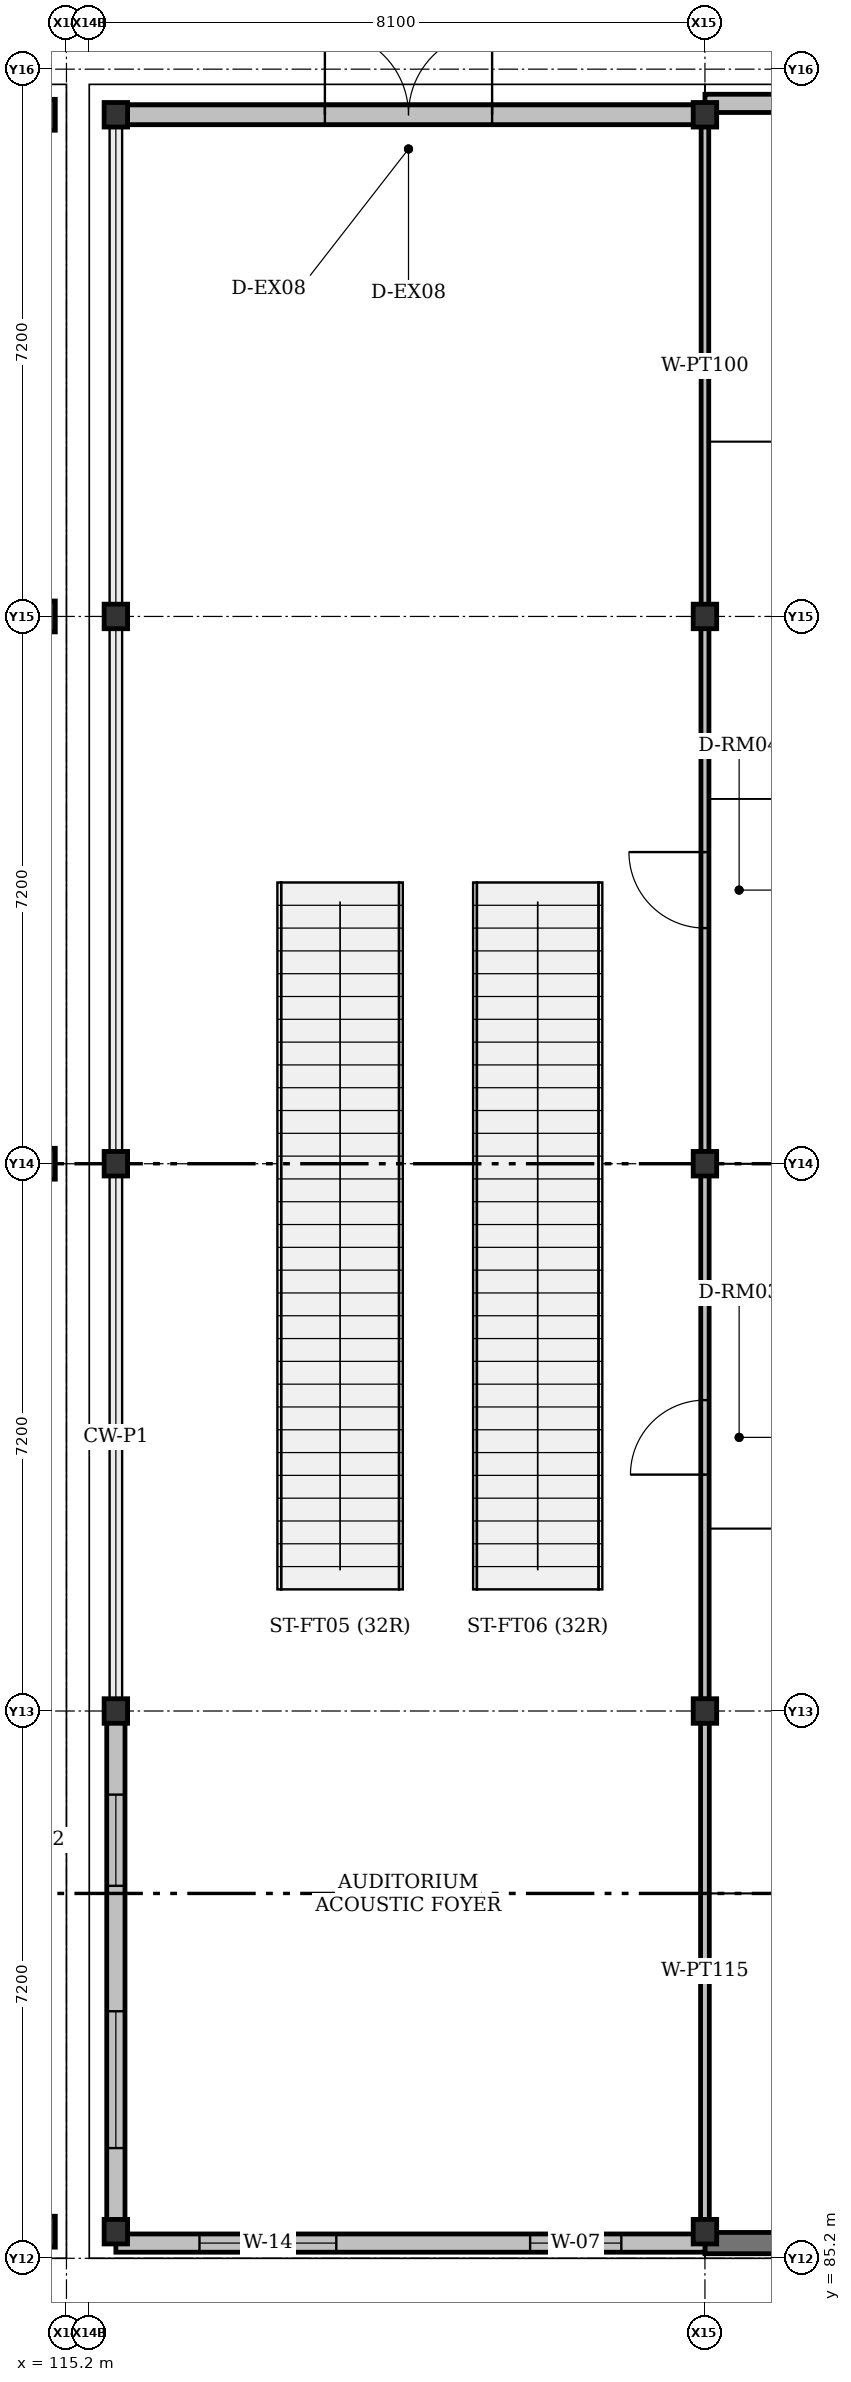
"""IFC4 building model, lengths in metres.
Left out: names, types, materials, properties, quantities, classifications, styles, units other than length and angle.
Written with IfcOpenShell. Run it as: python <this file> out.ifc"""

import sys

from ifc_helpers import new_model, si_unit, direction, frame, frame_2d, origin, origin_2d, place, context, subcontext, project, spatial, rectangle, hollow_circle, i_section, extrude, element, fill, save


model = new_model("IFC4")
c1 = context("Model", 3, precision=1e-05, world=origin(), true_north=direction((0.0, 1.0)))
c2 = subcontext(c1, "Body", "Model", "MODEL_VIEW")
j1 = project(units=[si_unit("LENGTHUNIT", "METRE"), si_unit("PLANEANGLEUNIT", "RADIAN")], contexts=[c1])
p1 = place(None, origin())
s1 = spatial("IfcSite", under=j1, at=p1, CompositionType="ELEMENT")
p2 = place(p1, origin())
s2 = spatial("IfcBuilding", under=s1, at=p2, CompositionType="ELEMENT")
p3 = place(p2, origin())
s3 = spatial("IfcBuildingStorey", under=s2, at=p3, CompositionType="ELEMENT", Elevation=0.0)
for number, where, z_axis, x_axis in (
    (1, (114.85, 85.55, 0.0), (0.0, 0.0, 1.0), (1.0, 0.0, 0.0)),
    (2, (114.85, 113.4, 0.0), (0.0, 0.0, 1.0), (1.0, 0.0, 0.0)),
    (3, (114.85, 99.6, 0.0), (0.0, 0.0, 1.0), (1.0, 0.0, 0.0)),
    (4, (114.85, 106.8, 0.0), (0.0, 0.0, 1.0), (1.0, 0.0, 0.0)),
):
    element("IfcColumn", number, at=place(p3, frame(where, z_axis=z_axis, x_axis=x_axis)), inside=s3, PredefinedType="COLUMN", context=c2, shape_type="SweptSolid", body=[
        extrude(hollow_circle(Radius=0.203, WallThickness=0.016, at=origin_2d()), origin(), (0.0, 0.0, 1.0), 5.4),
    ])
for number, where, z_axis, x_axis in (
    (5, (115.85, 85.55, 0.0), (0.0, 0.0, 1.0), (1.0, 0.0, 0.0)),
    (6, (115.85, 92.4, 0.0), (0.0, 0.0, 1.0), (1.0, 0.0, 0.0)),
    (7, (115.85, 99.6, 0.0), (0.0, 0.0, 1.0), (1.0, 0.0, 0.0)),
    (8, (115.85, 106.8, 0.0), (0.0, 0.0, 1.0), (1.0, 0.0, 0.0)),
    (9, (115.85, 113.4, 0.0), (0.0, 0.0, 1.0), (1.0, 0.0, 0.0)),
    (10, (123.6, 85.55, 0.0), (0.0, 0.0, 1.0), (1.0, 0.0, 0.0)),
    (11, (123.6, 92.4, 0.0), (0.0, 0.0, 1.0), (1.0, 0.0, 0.0)),
    (12, (123.6, 99.6, 0.0), (0.0, 0.0, 1.0), (1.0, 0.0, 0.0)),
    (13, (123.6, 106.8, 0.0), (0.0, 0.0, 1.0), (1.0, 0.0, 0.0)),
    (14, (123.6, 113.4, 0.0), (0.0, 0.0, 1.0), (1.0, 0.0, 0.0)),
):
    element("IfcColumn", number, at=place(p3, frame(where, z_axis=z_axis, x_axis=x_axis)), inside=s3, PredefinedType="COLUMN", context=c2, shape_type="SweptSolid", body=[
        extrude(i_section(OverallWidth=0.309, OverallDepth=0.323, WebThickness=0.014, FlangeThickness=0.023, FilletRadius=0.015, at=origin_2d()), origin(), (0.0, 0.0, 1.0), 5.4),
    ])
p4 = place(p3, frame((163.85, 85.4, 0.0), z_axis=(0.0, 0.0, 1.0), x_axis=(-1.0, 0.0, 0.0)))
e15 = element("IfcWall", 15, at=p4, inside=s3, PredefinedType="SOLIDWALL", context=c2, shape_type="SweptSolid", body=[
    extrude(rectangle(XDim=40.25, YDim=0.28, at=frame_2d((20.125, 0.0))), origin(), (0.0, 0.0, 1.0), 5.19),
])
p5 = place(p3, frame((115.85, 113.4, 0.0), z_axis=(0.0, 0.0, 1.0), x_axis=(1.0, 0.0, 0.0)))
e16 = element("IfcWall", 16, at=p5, inside=s3, PredefinedType="SOLIDWALL", context=c2, shape_type="SweptSolid", body=[
    extrude(rectangle(XDim=7.75, YDim=0.26, at=frame_2d((3.875, 0.0))), origin(), (0.0, 0.0, 1.0), 3.383),
])
p6 = place(p5, frame((2.75, 0.0, 0.0)))
e17 = element("IfcOpeningElement", 17, at=p6, cuts=e16, PredefinedType="OPENING", context=c2, shape_type="SweptSolid", body=[
    extrude(rectangle(XDim=2.2, YDim=2.4, at=frame_2d((1.1, 1.2))), frame((0.0, 0.13, 0.0), z_axis=(0.0, -1.0, 0.0), x_axis=(1.0, 0.0, 0.0)), (0.0, 0.0, 1.0), 0.26),
])
p7 = place(p3, frame((123.6, 113.4, 3.602), z_axis=(0.0, 0.0, 1.0), x_axis=(-1.0, 0.0, 0.0)))
e18 = element("IfcWall", 18, at=p7, inside=s3, PredefinedType="SOLIDWALL", context=c2, shape_type="SweptSolid", body=[
    extrude(rectangle(XDim=7.75, YDim=0.26, at=frame_2d((3.875, 0.0))), origin(), (0.0, 0.0, 1.0), 1.165),
])
p8 = place(p3, frame((115.85, 85.55, 0.0), z_axis=(0.0, 0.0, 1.0), x_axis=(0.0, 1.0, 0.0)))
e19 = element("IfcWall", 19, at=p8, inside=s3, PredefinedType="SOLIDWALL", context=c2, shape_type="SweptSolid", body=[
    extrude(rectangle(XDim=6.85, YDim=0.24, at=frame_2d((3.425, 0.0))), origin(), (0.0, 0.0, 1.0), 4.641),
])
p9 = place(p8, frame((1.1, 0.0, 0.92)))
e20 = element("IfcOpeningElement", 20, at=p9, cuts=e19, PredefinedType="OPENING", context=c2, shape_type="SweptSolid", body=[
    extrude(rectangle(XDim=1.8, YDim=1.4, at=frame_2d((0.9, 0.7))), frame((0.0, 0.12, 0.0), z_axis=(0.0, -1.0, 0.0), x_axis=(1.0, 0.0, 0.0)), (0.0, 0.0, 1.0), 0.24),
])
p10 = place(p8, frame((4.55, 0.0, 0.92)))
e21 = element("IfcOpeningElement", 21, at=p10, cuts=e19, PredefinedType="OPENING", context=c2, shape_type="SweptSolid", body=[
    extrude(rectangle(XDim=1.2, YDim=1.7, at=frame_2d((0.6, 0.85))), frame((0.0, 0.12, 0.0), z_axis=(0.0, -1.0, 0.0), x_axis=(1.0, 0.0, 0.0)), (0.0, 0.0, 1.0), 0.24),
])
p11 = place(p3, frame((123.6, 113.55, 0.0), z_axis=(0.0, 0.0, 1.0), x_axis=(1.0, 0.0, 0.0)))
e22 = element("IfcWall", 22, at=p11, inside=s3, PredefinedType="SOLIDWALL", context=c2, shape_type="SweptSolid", body=[
    extrude(rectangle(XDim=8.1, YDim=0.24, at=frame_2d((4.05, 0.0))), origin(), (0.0, 0.0, 1.0), 4.7),
])
p12 = place(p11, frame((1.1, 0.0, 0.92)))
e23 = element("IfcOpeningElement", 23, at=p12, cuts=e22, PredefinedType="OPENING", context=c2, shape_type="SweptSolid", body=[
    extrude(rectangle(XDim=1.8, YDim=1.4, at=frame_2d((0.9, 0.7))), frame((0.0, 0.12, 0.0), z_axis=(0.0, -1.0, 0.0), x_axis=(1.0, 0.0, 0.0)), (0.0, 0.0, 1.0), 0.24),
])
p13 = place(p11, frame((5.8, 0.0, 0.92)))
e24 = element("IfcOpeningElement", 24, at=p13, cuts=e22, PredefinedType="OPENING", context=c2, shape_type="SweptSolid", body=[
    extrude(rectangle(XDim=1.2, YDim=1.7, at=frame_2d((0.6, 0.85))), frame((0.0, 0.12, 0.0), z_axis=(0.0, -1.0, 0.0), x_axis=(1.0, 0.0, 0.0)), (0.0, 0.0, 1.0), 0.24),
])
p14 = place(p3, frame((123.6, 85.4, 0.0), z_axis=(0.0, 0.0, 1.0), x_axis=(-1.0, 0.0, 0.0)))
e25 = element("IfcWall", 25, at=p14, inside=s3, PredefinedType="SOLIDWALL", context=c2, shape_type="SweptSolid", body=[
    extrude(rectangle(XDim=7.75, YDim=0.24, at=frame_2d((3.875, 0.0))), origin(), (0.0, 0.0, 1.0), 4.7),
])
p15 = place(p14, frame((1.1, 0.0, 0.92)))
e26 = element("IfcOpeningElement", 26, at=p15, cuts=e25, PredefinedType="OPENING", context=c2, shape_type="SweptSolid", body=[
    extrude(rectangle(XDim=1.2, YDim=1.55, at=frame_2d((0.6, 0.775))), frame((0.0, 0.12, 0.0), z_axis=(0.0, -1.0, 0.0), x_axis=(1.0, 0.0, 0.0)), (0.0, 0.0, 1.0), 0.24),
])
p16 = place(p14, frame((4.85, 0.0, 0.92)))
e27 = element("IfcOpeningElement", 27, at=p16, cuts=e25, PredefinedType="OPENING", context=c2, shape_type="SweptSolid", body=[
    extrude(rectangle(XDim=1.8, YDim=1.7, at=frame_2d((0.9, 0.85))), frame((0.0, 0.12, 0.0), z_axis=(0.0, -1.0, 0.0), x_axis=(1.0, 0.0, 0.0)), (0.0, 0.0, 1.0), 0.24),
])
p17 = place(p3, frame((123.6, 85.707, 0.0), z_axis=(0.0, 0.0, 1.0), x_axis=(0.0, 1.0, 0.0)))
e28 = element("IfcWall", 28, at=p17, inside=s3, PredefinedType="PARTITIONING", context=c2, shape_type="SweptSolid", body=[
    extrude(rectangle(XDim=6.537, YDim=0.115, at=frame_2d((3.269, 0.0))), origin(), (0.0, 0.0, 1.0), 4.641),
])
p18 = place(p3, frame((123.6, 92.556, 0.0), z_axis=(0.0, 0.0, 1.0), x_axis=(0.0, 1.0, 0.0)))
e29 = element("IfcWall", 29, at=p18, inside=s3, PredefinedType="PARTITIONING", context=c2, shape_type="SweptSolid", body=[
    extrude(rectangle(XDim=6.887, YDim=0.11, at=frame_2d((3.444, 0.0))), origin(), (0.0, 0.0, 1.0), 4.641),
])
p19 = place(p18, frame((2.954, 0.0, 0.0)))
e30 = element("IfcOpeningElement", 30, at=p19, cuts=e29, PredefinedType="OPENING", context=c2, shape_type="SweptSolid", body=[
    extrude(rectangle(XDim=0.98, YDim=2.1, at=frame_2d((0.49, 1.05))), frame((0.0, 0.055, 0.0), z_axis=(0.0, -1.0, 0.0), x_axis=(1.0, 0.0, 0.0)), (0.0, 0.0, 1.0), 0.11),
])
p20 = place(p3, frame((123.6, 99.757, 0.0), z_axis=(0.0, 0.0, 1.0), x_axis=(0.0, 1.0, 0.0)))
e31 = element("IfcWall", 31, at=p20, inside=s3, PredefinedType="PARTITIONING", context=c2, shape_type="SweptSolid", body=[
    extrude(rectangle(XDim=6.887, YDim=0.105, at=frame_2d((3.443, 0.0))), origin(), (0.0, 0.0, 1.0), 4.641),
])
p21 = place(p20, frame((2.944, 0.0, 0.0)))
e32 = element("IfcOpeningElement", 32, at=p21, cuts=e31, PredefinedType="OPENING", context=c2, shape_type="SweptSolid", body=[
    extrude(rectangle(XDim=1.0, YDim=2.1, at=frame_2d((0.5, 1.05))), frame((0.0, 0.052, 0.0), z_axis=(0.0, -1.0, 0.0), x_axis=(1.0, 0.0, 0.0)), (0.0, 0.0, 1.0), 0.105),
])
p22 = place(p3, frame((123.6, 106.957, 0.0), z_axis=(0.0, 0.0, 1.0), x_axis=(0.0, 1.0, 0.0)))
e33 = element("IfcWall", 33, at=p22, inside=s3, PredefinedType="PARTITIONING", context=c2, shape_type="SweptSolid", body=[
    extrude(rectangle(XDim=6.287, YDim=0.1, at=frame_2d((3.144, 0.0))), origin(), (0.0, 0.0, 1.0), 4.641),
])
p23 = place(p6, origin())
e34 = element("IfcDoor", 34, at=p23, inside=s3, OperationType="DOUBLE_DOOR_SINGLE_SWING", PredefinedType="DOOR", context=c2, shape_type="SweptSolid", body=[
    extrude(rectangle(XDim=2.2, YDim=2.4, at=frame_2d((1.1, 1.2))), frame((0.0, 0.025, 0.0), z_axis=(0.0, -1.0, 0.0), x_axis=(1.0, 0.0, 0.0)), (0.0, 0.0, 1.0), 0.05),
])
fill(e17, e34)
p24 = place(p9, origin())
e35 = element("IfcWindow", 35, at=p24, inside=s3, PartitioningType="DOUBLE_PANEL_VERTICAL", PredefinedType="WINDOW", context=c2, shape_type="SweptSolid", body=[
    extrude(rectangle(XDim=1.8, YDim=1.4, at=frame_2d((0.9, 0.7))), frame((0.0, 0.03, 0.0), z_axis=(0.0, -1.0, 0.0), x_axis=(1.0, 0.0, 0.0)), (0.0, 0.0, 1.0), 0.06),
])
fill(e20, e35)
p25 = place(p10, origin())
e36 = element("IfcWindow", 36, at=p25, inside=s3, PartitioningType="SINGLE_PANEL", PredefinedType="WINDOW", context=c2, shape_type="SweptSolid", body=[
    extrude(rectangle(XDim=1.2, YDim=1.7, at=frame_2d((0.6, 0.85))), frame((0.0, 0.03, 0.0), z_axis=(0.0, -1.0, 0.0), x_axis=(1.0, 0.0, 0.0)), (0.0, 0.0, 1.0), 0.06),
])
fill(e21, e36)
p26 = place(p15, origin())
e37 = element("IfcWindow", 37, at=p26, inside=s3, PartitioningType="SINGLE_PANEL", PredefinedType="WINDOW", context=c2, shape_type="SweptSolid", body=[
    extrude(rectangle(XDim=1.2, YDim=1.55, at=frame_2d((0.6, 0.775))), frame((0.0, 0.03, 0.0), z_axis=(0.0, -1.0, 0.0), x_axis=(1.0, 0.0, 0.0)), (0.0, 0.0, 1.0), 0.06),
])
fill(e26, e37)
p27 = place(p16, origin())
e38 = element("IfcWindow", 38, at=p27, inside=s3, PartitioningType="DOUBLE_PANEL_VERTICAL", PredefinedType="WINDOW", context=c2, shape_type="SweptSolid", body=[
    extrude(rectangle(XDim=1.8, YDim=1.7, at=frame_2d((0.9, 0.85))), frame((0.0, 0.03, 0.0), z_axis=(0.0, -1.0, 0.0), x_axis=(1.0, 0.0, 0.0)), (0.0, 0.0, 1.0), 0.06),
])
fill(e27, e38)
p28 = place(p19, origin())
e39 = element("IfcDoor", 39, at=p28, inside=s3, OperationType="SINGLE_SWING_LEFT", PredefinedType="DOOR", context=c2, shape_type="SweptSolid", body=[
    extrude(rectangle(XDim=0.98, YDim=2.1, at=frame_2d((0.49, 1.05))), frame((0.0, 0.025, 0.0), z_axis=(0.0, -1.0, 0.0), x_axis=(1.0, 0.0, 0.0)), (0.0, 0.0, 1.0), 0.05),
])
fill(e30, e39)
p29 = place(p21, origin())
e40 = element("IfcDoor", 40, at=p29, inside=s3, OperationType="SINGLE_SWING_RIGHT", PredefinedType="DOOR", context=c2, shape_type="SweptSolid", body=[
    extrude(rectangle(XDim=1.0, YDim=2.1, at=frame_2d((0.5, 1.05))), frame((0.0, 0.025, 0.0), z_axis=(0.0, -1.0, 0.0), x_axis=(1.0, 0.0, 0.0)), (0.0, 0.0, 1.0), 0.05),
])
fill(e32, e40)
save(model, sys.argv[1])
